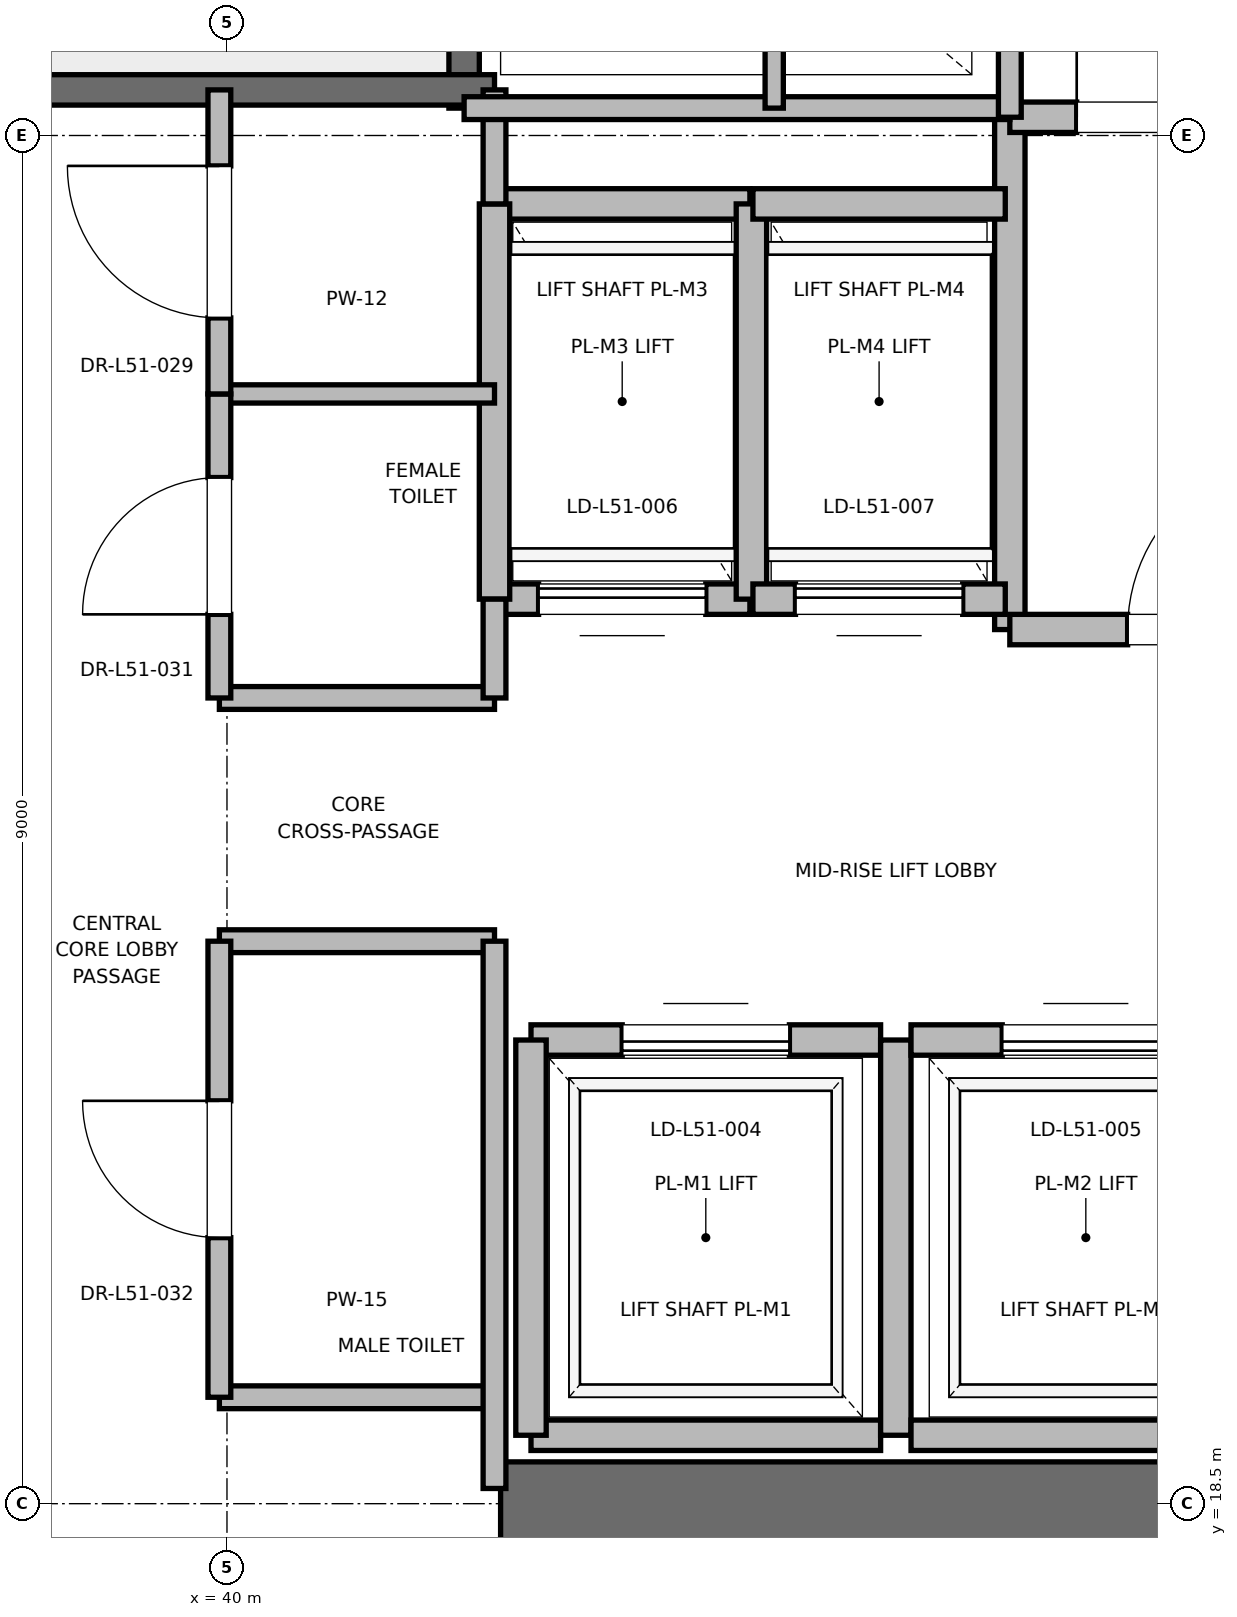
"""IFC4 building model, lengths in metres.
Left out: names, types, materials, properties, quantities, classifications, styles, units other than length and angle.
Written with IfcOpenShell. Run it as: python <this file> out.ifc"""

import sys

from ifc_helpers import new_model, si_unit, direction, frame, frame_2d, origin, place, context, subcontext, project, spatial, rectangle, extrude, element, fill, save


model = new_model("IFC4")
c1 = context("Model", 3, precision=1e-05, world=origin(), true_north=direction((0.0, 1.0)))
c2 = subcontext(c1, "Body", "Model", "MODEL_VIEW")
j1 = project(units=[si_unit("LENGTHUNIT", "METRE"), si_unit("PLANEANGLEUNIT", "RADIAN")], contexts=[c1])
p1 = place(None, origin())
s1 = spatial("IfcSite", under=j1, at=p1, CompositionType="ELEMENT")
p2 = place(p1, origin())
s2 = spatial("IfcBuilding", under=s1, at=p2, CompositionType="ELEMENT")
p3 = place(p2, frame((0.0, 0.0, 221.2)))
s3 = spatial("IfcBuildingStorey", under=s2, at=p3, CompositionType="ELEMENT", Elevation=221.2)
p4 = place(p3, frame((41.8, 18.5, 0.0), z_axis=(0.0, 0.0, 1.0), x_axis=(1.0, 0.0, 0.0)))
e1 = element("IfcWall", 1, at=p4, inside=s3, PredefinedType="SHEAR", context=c2, shape_type="SweptSolid", body=[
    extrude(rectangle(XDim=9.2, YDim=0.55, at=frame_2d((4.6, 0.0))), origin(), (0.0, 0.0, 1.0), 3.775),
])
p5 = place(p3, frame((41.56, 27.68, 0.0), z_axis=(0.0, 0.0, 1.0), x_axis=(0.0, 1.0, 0.0)))
e2 = element("IfcWall", 2, at=p5, inside=s3, PredefinedType="SOLIDWALL", context=c2, shape_type="SweptSolid", body=[
    extrude(rectangle(XDim=8.57, YDim=0.2, at=frame_2d((4.285, 0.0))), origin(), (0.0, 0.0, 1.0), 3.775),
])
p6 = place(p3, frame((38.44, 27.8, 0.0), z_axis=(0.0, 0.0, 1.0), x_axis=(1.0, 0.0, 0.0)))
e3 = element("IfcWall", 3, at=p6, inside=s3, PredefinedType="SOLIDWALL", context=c2, shape_type="SweptSolid", body=[
    extrude(rectangle(XDim=3.32, YDim=0.2, at=frame_2d((1.66, 0.0))), origin(), (0.0, 0.0, 1.0), 3.775),
])
p7 = place(p3, frame((45.15, 24.25, 0.0), z_axis=(0.0, 0.0, 1.0), x_axis=(0.0, 1.0, 0.0)))
e4 = element("IfcWall", 4, at=p7, inside=s3, PredefinedType="PARTITIONING", context=c2, shape_type="SweptSolid", body=[
    extrude(rectangle(XDim=3.37, YDim=0.2, at=frame_2d((1.685, 0.0))), origin(), (0.0, 0.0, 1.0), 3.775),
])
p8 = place(p3, frame((45.15, 24.25, 0.0), z_axis=(0.0, 0.0, 1.0), x_axis=(1.0, 0.0, 0.0)))
e5 = element("IfcWall", 5, at=p8, inside=s3, PredefinedType="PARTITIONING", context=c2, shape_type="SweptSolid", body=[
    extrude(rectangle(XDim=2.7, YDim=0.2, at=frame_2d((1.35, 0.0))), origin(), (0.0, 0.0, 1.0), 3.775),
])
p9 = place(p8, frame((0.775, 0.0, 0.0)))
e6 = element("IfcOpeningElement", 6, at=p9, cuts=e5, PredefinedType="OPENING", context=c2, shape_type="SweptSolid", body=[
    extrude(rectangle(XDim=1.15, YDim=2.2, at=frame_2d((0.575, 1.1))), frame((0.0, 0.1, 0.0), z_axis=(0.0, -1.0, 0.0), x_axis=(1.0, 0.0, 0.0)), (0.0, 0.0, 1.0), 0.2),
])
p10 = place(p3, frame((45.15, 27.62, 0.0), z_axis=(0.0, 0.0, 1.0), x_axis=(1.0, 0.0, 0.0)))
e7 = element("IfcWall", 7, at=p10, inside=s3, PredefinedType="PARTITIONING", context=c2, shape_type="SweptSolid", body=[
    extrude(rectangle(XDim=2.03, YDim=0.2, at=frame_2d((1.015, 0.0))), origin(), (0.0, 0.0, 1.0), 3.775),
])
p11 = place(p10, frame((0.44, 0.0, 0.0)))
e8 = element("IfcOpeningElement", 8, at=p11, cuts=e7, PredefinedType="OPENING", context=c2, shape_type="SweptSolid", body=[
    extrude(rectangle(XDim=1.15, YDim=2.2, at=frame_2d((0.575, 1.1))), frame((0.0, 0.1, 0.0), z_axis=(0.0, -1.0, 0.0), x_axis=(1.0, 0.0, 0.0)), (0.0, 0.0, 1.0), 0.2),
])
p12 = place(p3, frame((42.0, 18.95, 0.0), z_axis=(0.0, 0.0, 1.0), x_axis=(1.0, 0.0, 0.0)))
e9 = element("IfcWall", 9, at=p12, inside=s3, PredefinedType="SOLIDWALL", context=c2, shape_type="SweptSolid", body=[
    extrude(rectangle(XDim=2.3, YDim=0.2, at=frame_2d((1.15, 0.0))), origin(), (0.0, 0.0, 1.0), 2.755),
])
p13 = place(p3, frame((44.3, 21.55, 0.0), z_axis=(0.0, 0.0, 1.0), x_axis=(-1.0, 0.0, 0.0)))
e10 = element("IfcWall", 10, at=p13, inside=s3, PredefinedType="SOLIDWALL", context=c2, shape_type="SweptSolid", body=[
    extrude(rectangle(XDim=2.3, YDim=0.2, at=frame_2d((1.15, 0.0))), origin(), (0.0, 0.0, 1.0), 3.775),
])
p14 = place(p13, frame((0.6, 0.0, 0.0)))
e11 = element("IfcOpeningElement", 11, at=p14, cuts=e10, PredefinedType="OPENING", context=c2, shape_type="SweptSolid", body=[
    extrude(rectangle(XDim=1.1, YDim=2.2, at=frame_2d((0.55, 1.1))), frame((0.0, 0.1, 0.0), z_axis=(0.0, -1.0, 0.0), x_axis=(1.0, 0.0, 0.0)), (0.0, 0.0, 1.0), 0.2),
])
p15 = place(p3, frame((42.0, 21.55, 0.0), z_axis=(0.0, 0.0, 1.0), x_axis=(0.0, -1.0, 0.0)))
e12 = element("IfcWall", 12, at=p15, inside=s3, PredefinedType="SOLIDWALL", context=c2, shape_type="SweptSolid", body=[
    extrude(rectangle(XDim=2.6, YDim=0.2, at=frame_2d((1.3, 0.0))), origin(), (0.0, 0.0, 1.0), 2.755),
])
p16 = place(p3, frame((44.4, 18.95, 0.0), z_axis=(0.0, 0.0, 1.0), x_axis=(0.0, 1.0, 0.0)))
e13 = element("IfcWall", 13, at=p16, inside=s3, PredefinedType="SOLIDWALL", context=c2, shape_type="SweptSolid", body=[
    extrude(rectangle(XDim=2.6, YDim=0.2, at=frame_2d((1.3, 0.0))), origin(), (0.0, 0.0, 1.0), 3.775),
])
p17 = place(p3, frame((44.5, 18.95, 0.0), z_axis=(0.0, 0.0, 1.0), x_axis=(1.0, 0.0, 0.0)))
e14 = element("IfcWall", 14, at=p17, inside=s3, PredefinedType="SOLIDWALL", context=c2, shape_type="SweptSolid", body=[
    extrude(rectangle(XDim=2.3, YDim=0.2, at=frame_2d((1.15, 0.0))), origin(), (0.0, 0.0, 1.0), 3.775),
])
p18 = place(p3, frame((46.8, 21.55, 0.0), z_axis=(0.0, 0.0, 1.0), x_axis=(-1.0, 0.0, 0.0)))
e15 = element("IfcWall", 15, at=p18, inside=s3, PredefinedType="SOLIDWALL", context=c2, shape_type="SweptSolid", body=[
    extrude(rectangle(XDim=2.3, YDim=0.2, at=frame_2d((1.15, 0.0))), origin(), (0.0, 0.0, 1.0), 3.775),
])
p19 = place(p18, frame((0.6, 0.0, 0.0)))
e16 = element("IfcOpeningElement", 16, at=p19, cuts=e15, PredefinedType="OPENING", context=c2, shape_type="SweptSolid", body=[
    extrude(rectangle(XDim=1.1, YDim=2.2, at=frame_2d((0.55, 1.1))), frame((0.0, 0.1, 0.0), z_axis=(0.0, -1.0, 0.0), x_axis=(1.0, 0.0, 0.0)), (0.0, 0.0, 1.0), 0.2),
])
p20 = place(p3, frame((41.76, 24.45, 0.0), z_axis=(0.0, 0.0, 1.0), x_axis=(1.0, 0.0, 0.0)))
e17 = element("IfcWall", 17, at=p20, inside=s3, PredefinedType="SOLIDWALL", context=c2, shape_type="SweptSolid", body=[
    extrude(rectangle(XDim=1.68, YDim=0.2, at=frame_2d((0.84, 0.0))), origin(), (0.0, 0.0, 1.0), 3.775),
])
p21 = place(p20, frame((0.29, 0.0, 0.0)))
e18 = element("IfcOpeningElement", 18, at=p21, cuts=e17, PredefinedType="OPENING", context=c2, shape_type="SweptSolid", body=[
    extrude(rectangle(XDim=1.1, YDim=2.2, at=frame_2d((0.55, 1.1))), frame((0.0, 0.1, 0.0), z_axis=(0.0, -1.0, 0.0), x_axis=(1.0, 0.0, 0.0)), (0.0, 0.0, 1.0), 0.2),
])
p22 = place(p3, frame((43.44, 27.05, 0.0), z_axis=(0.0, 0.0, 1.0), x_axis=(-1.0, 0.0, 0.0)))
e19 = element("IfcWall", 19, at=p22, inside=s3, PredefinedType="SOLIDWALL", context=c2, shape_type="SweptSolid", body=[
    extrude(rectangle(XDim=1.68, YDim=0.2, at=frame_2d((0.84, 0.0))), origin(), (0.0, 0.0, 1.0), 3.775),
])
for number, where, z_axis, x_axis in (
    (20, (41.76, 27.05, 0.0), (0.0, 0.0, 1.0), (0.0, -1.0, 0.0)),
    (21, (43.45, 24.45, 0.0), (0.0, 0.0, 1.0), (0.0, 1.0, 0.0)),
):
    element("IfcWall", number, at=place(p3, frame(where, z_axis=z_axis, x_axis=x_axis)), inside=s3, PredefinedType="SOLIDWALL", context=c2, shape_type="SweptSolid", body=[
        extrude(rectangle(XDim=2.6, YDim=0.2, at=frame_2d((1.3, 0.0))), origin(), (0.0, 0.0, 1.0), 3.775),
    ])
p23 = place(p3, frame((43.46, 24.45, 0.0), z_axis=(0.0, 0.0, 1.0), x_axis=(1.0, 0.0, 0.0)))
e22 = element("IfcWall", 22, at=p23, inside=s3, PredefinedType="SOLIDWALL", context=c2, shape_type="SweptSolid", body=[
    extrude(rectangle(XDim=1.66, YDim=0.2, at=frame_2d((0.83, 0.0))), origin(), (0.0, 0.0, 1.0), 3.775),
])
p24 = place(p23, frame((0.28, 0.0, 0.0)))
e23 = element("IfcOpeningElement", 23, at=p24, cuts=e22, PredefinedType="OPENING", context=c2, shape_type="SweptSolid", body=[
    extrude(rectangle(XDim=1.1, YDim=2.2, at=frame_2d((0.55, 1.1))), frame((0.0, 0.1, 0.0), z_axis=(0.0, -1.0, 0.0), x_axis=(1.0, 0.0, 0.0)), (0.0, 0.0, 1.0), 0.2),
])
p25 = place(p3, frame((45.12, 27.05, 0.0), z_axis=(0.0, 0.0, 1.0), x_axis=(-1.0, 0.0, 0.0)))
e24 = element("IfcWall", 24, at=p25, inside=s3, PredefinedType="SOLIDWALL", context=c2, shape_type="SweptSolid", body=[
    extrude(rectangle(XDim=1.66, YDim=0.2, at=frame_2d((0.83, 0.0))), origin(), (0.0, 0.0, 1.0), 3.775),
])
for number, where, z_axis, x_axis in (
    (25, (39.95, 19.2, 0.0), (0.0, 0.0, 1.0), (1.0, 0.0, 0.0)),
    (26, (39.95, 22.2, 0.0), (0.0, 0.0, 1.0), (1.0, 0.0, 0.0)),
    (27, (39.95, 23.8, 0.0), (0.0, 0.0, 1.0), (1.0, 0.0, 0.0)),
):
    element("IfcWall", number, at=place(p3, frame(where, z_axis=z_axis, x_axis=x_axis)), inside=s3, PredefinedType="PARTITIONING", context=c2, shape_type="SweptSolid", body=[
        extrude(rectangle(XDim=1.81, YDim=0.15, at=frame_2d((0.905, 0.0))), origin(), (0.0, 0.0, 1.0), 2.85),
    ])
p26 = place(p3, frame((39.95, 25.8, 0.0), z_axis=(0.0, 0.0, 1.0), x_axis=(1.0, 0.0, 0.0)))
e28 = element("IfcWall", 28, at=p26, inside=s3, PredefinedType="PARTITIONING", context=c2, shape_type="SweptSolid", body=[
    extrude(rectangle(XDim=1.81, YDim=0.12, at=frame_2d((0.905, 0.0))), origin(), (0.0, 0.0, 1.0), 2.85),
])
p27 = place(p3, frame((41.76, 18.6, 0.0), z_axis=(0.0, 0.0, 1.0), x_axis=(0.0, 1.0, 0.0)))
e29 = element("IfcWall", 29, at=p27, inside=s3, PredefinedType="PARTITIONING", context=c2, shape_type="SweptSolid", body=[
    extrude(rectangle(XDim=3.6, YDim=0.15, at=frame_2d((1.8, 0.0))), origin(), (0.0, 0.0, 1.0), 2.755),
])
p28 = place(p3, frame((41.76, 23.8, 0.0), z_axis=(0.0, 0.0, 1.0), x_axis=(0.0, 1.0, 0.0)))
e30 = element("IfcWall", 30, at=p28, inside=s3, PredefinedType="PARTITIONING", context=c2, shape_type="SweptSolid", body=[
    extrude(rectangle(XDim=0.65, YDim=0.15, at=frame_2d((0.325, 0.0))), origin(), (0.0, 0.0, 1.0), 2.85),
])
p29 = place(p3, frame((41.76, 27.05, 0.0), z_axis=(0.0, 0.0, 1.0), x_axis=(0.0, 1.0, 0.0)))
e31 = element("IfcWall", 31, at=p29, inside=s3, PredefinedType="PARTITIONING", context=c2, shape_type="SweptSolid", body=[
    extrude(rectangle(XDim=0.75, YDim=0.15, at=frame_2d((0.375, 0.0))), origin(), (0.0, 0.0, 1.0), 2.85),
])
p30 = place(p3, frame((39.95, 19.2, 0.0), z_axis=(0.0, 0.0, 1.0), x_axis=(0.0, 1.0, 0.0)))
e32 = element("IfcWall", 32, at=p30, inside=s3, PredefinedType="PARTITIONING", context=c2, shape_type="SweptSolid", body=[
    extrude(rectangle(XDim=3.0, YDim=0.15, at=frame_2d((1.5, 0.0))), origin(), (0.0, 0.0, 1.0), 2.85),
])
p31 = place(p30, frame((1.05, 0.0, 0.0)))
e33 = element("IfcOpeningElement", 33, at=p31, cuts=e32, PredefinedType="OPENING", context=c2, shape_type="SweptSolid", body=[
    extrude(rectangle(XDim=0.9, YDim=2.1, at=frame_2d((0.45, 1.05))), frame((0.0, 0.075, 0.0), z_axis=(0.0, -1.0, 0.0), x_axis=(1.0, 0.0, 0.0)), (0.0, 0.0, 1.0), 0.15),
])
p32 = place(p3, frame((39.95, 23.8, 0.0), z_axis=(0.0, 0.0, 1.0), x_axis=(0.0, 1.0, 0.0)))
e34 = element("IfcWall", 34, at=p32, inside=s3, PredefinedType="PARTITIONING", context=c2, shape_type="SweptSolid", body=[
    extrude(rectangle(XDim=2.0, YDim=0.15, at=frame_2d((1.0, 0.0))), origin(), (0.0, 0.0, 1.0), 2.85),
])
p33 = place(p32, frame((0.55, 0.0, 0.0)))
e35 = element("IfcOpeningElement", 35, at=p33, cuts=e34, PredefinedType="OPENING", context=c2, shape_type="SweptSolid", body=[
    extrude(rectangle(XDim=0.9, YDim=2.1, at=frame_2d((0.45, 1.05))), frame((0.0, 0.075, 0.0), z_axis=(0.0, -1.0, 0.0), x_axis=(1.0, 0.0, 0.0)), (0.0, 0.0, 1.0), 0.15),
])
p34 = place(p3, frame((39.95, 25.8, 0.0), z_axis=(0.0, 0.0, 1.0), x_axis=(0.0, 1.0, 0.0)))
e36 = element("IfcWall", 36, at=p34, inside=s3, PredefinedType="PARTITIONING", context=c2, shape_type="SweptSolid", body=[
    extrude(rectangle(XDim=2.0, YDim=0.15, at=frame_2d((1.0, 0.0))), origin(), (0.0, 0.0, 1.0), 2.85),
])
p35 = place(p34, frame((0.5, 0.0, 0.0)))
e37 = element("IfcOpeningElement", 37, at=p35, cuts=e36, PredefinedType="OPENING", context=c2, shape_type="SweptSolid", body=[
    extrude(rectangle(XDim=1.0, YDim=2.15, at=frame_2d((0.5, 1.075))), frame((0.0, 0.075, 0.0), z_axis=(0.0, -1.0, 0.0), x_axis=(1.0, 0.0, 0.0)), (0.0, 0.0, 1.0), 0.15),
])
p36 = place(p3, frame((41.56, 27.68, 0.0), z_axis=(0.0, 0.0, 1.0), x_axis=(1.0, 0.0, 0.0)))
e38 = element("IfcWall", 38, at=p36, inside=s3, PredefinedType="PARTITIONING", context=c2, shape_type="SweptSolid", body=[
    extrude(rectangle(XDim=3.59, YDim=0.15, at=frame_2d((1.795, 0.0))), origin(), (0.0, 0.0, 1.0), 2.85),
])
p37 = place(p3, frame((45.15, 27.62, 0.0), z_axis=(0.0, 0.0, 1.0), x_axis=(0.0, 1.0, 0.0)))
e39 = element("IfcWall", 39, at=p37, inside=s3, PredefinedType="PARTITIONING", context=c2, shape_type="SweptSolid", body=[
    extrude(rectangle(XDim=3.1, YDim=0.15, at=frame_2d((1.55, 0.0))), origin(), (0.0, 0.0, 1.0), 2.85),
])
p38 = place(p3, frame((43.6, 27.68, 0.0), z_axis=(0.0, 0.0, 1.0), x_axis=(0.0, 1.0, 0.0)))
e40 = element("IfcWall", 40, at=p38, inside=s3, PredefinedType="PARTITIONING", context=c2, shape_type="SweptSolid", body=[
    extrude(rectangle(XDim=3.04, YDim=0.12, at=frame_2d((1.52, 0.0))), origin(), (0.0, 0.0, 1.0), 2.85),
])
p39 = place(p9, origin())
e41 = element("IfcDoor", 41, at=p39, inside=s3, OperationType="SINGLE_SWING_RIGHT", PredefinedType="DOOR", context=c2, shape_type="SweptSolid", body=[
    extrude(rectangle(XDim=1.15, YDim=2.2, at=frame_2d((0.575, 1.1))), frame((0.0, 0.025, 0.0), z_axis=(0.0, -1.0, 0.0), x_axis=(1.0, 0.0, 0.0)), (0.0, 0.0, 1.0), 0.05),
])
fill(e6, e41)
p40 = place(p11, origin())
e42 = element("IfcDoor", 42, at=p40, inside=s3, OperationType="SINGLE_SWING_LEFT", PredefinedType="DOOR", context=c2, shape_type="SweptSolid", body=[
    extrude(rectangle(XDim=1.15, YDim=2.2, at=frame_2d((0.575, 1.1))), frame((0.0, 0.025, 0.0), z_axis=(0.0, -1.0, 0.0), x_axis=(1.0, 0.0, 0.0)), (0.0, 0.0, 1.0), 0.05),
])
fill(e8, e42)
p41 = place(p14, origin())
e43 = element("IfcDoor", 43, at=p41, inside=s3, OperationType="SLIDING_TO_RIGHT", PredefinedType="DOOR", context=c2, shape_type="SweptSolid", body=[
    extrude(rectangle(XDim=1.1, YDim=2.2, at=frame_2d((0.55, 1.1))), frame((0.0, 0.025, 0.0), z_axis=(0.0, -1.0, 0.0), x_axis=(1.0, 0.0, 0.0)), (0.0, 0.0, 1.0), 0.05),
])
fill(e11, e43)
p42 = place(p19, origin())
e44 = element("IfcDoor", 44, at=p42, inside=s3, OperationType="SLIDING_TO_RIGHT", PredefinedType="DOOR", context=c2, shape_type="SweptSolid", body=[
    extrude(rectangle(XDim=1.1, YDim=2.2, at=frame_2d((0.55, 1.1))), frame((0.0, 0.025, 0.0), z_axis=(0.0, -1.0, 0.0), x_axis=(1.0, 0.0, 0.0)), (0.0, 0.0, 1.0), 0.05),
])
fill(e16, e44)
p43 = place(p21, origin())
e45 = element("IfcDoor", 45, at=p43, inside=s3, OperationType="SLIDING_TO_RIGHT", PredefinedType="DOOR", context=c2, shape_type="SweptSolid", body=[
    extrude(rectangle(XDim=1.1, YDim=2.2, at=frame_2d((0.55, 1.1))), frame((0.0, 0.025, 0.0), z_axis=(0.0, -1.0, 0.0), x_axis=(1.0, 0.0, 0.0)), (0.0, 0.0, 1.0), 0.05),
])
fill(e18, e45)
p44 = place(p24, origin())
e46 = element("IfcDoor", 46, at=p44, inside=s3, OperationType="SLIDING_TO_RIGHT", PredefinedType="DOOR", context=c2, shape_type="SweptSolid", body=[
    extrude(rectangle(XDim=1.1, YDim=2.2, at=frame_2d((0.55, 1.1))), frame((0.0, 0.025, 0.0), z_axis=(0.0, -1.0, 0.0), x_axis=(1.0, 0.0, 0.0)), (0.0, 0.0, 1.0), 0.05),
])
fill(e23, e46)
p45 = place(p31, origin())
e47 = element("IfcDoor", 47, at=p45, inside=s3, OperationType="SINGLE_SWING_RIGHT", PredefinedType="DOOR", context=c2, shape_type="SweptSolid", body=[
    extrude(rectangle(XDim=0.9, YDim=2.1, at=frame_2d((0.45, 1.05))), frame((0.0, 0.025, 0.0), z_axis=(0.0, -1.0, 0.0), x_axis=(1.0, 0.0, 0.0)), (0.0, 0.0, 1.0), 0.05),
])
fill(e33, e47)
p46 = place(p33, origin())
e48 = element("IfcDoor", 48, at=p46, inside=s3, OperationType="SINGLE_SWING_LEFT", PredefinedType="DOOR", context=c2, shape_type="SweptSolid", body=[
    extrude(rectangle(XDim=0.9, YDim=2.1, at=frame_2d((0.45, 1.05))), frame((0.0, 0.025, 0.0), z_axis=(0.0, -1.0, 0.0), x_axis=(1.0, 0.0, 0.0)), (0.0, 0.0, 1.0), 0.05),
])
fill(e35, e48)
p47 = place(p35, origin())
e49 = element("IfcDoor", 49, at=p47, inside=s3, OperationType="SINGLE_SWING_RIGHT", PredefinedType="DOOR", context=c2, shape_type="SweptSolid", body=[
    extrude(rectangle(XDim=1.0, YDim=2.15, at=frame_2d((0.5, 1.075))), frame((0.0, 0.025, 0.0), z_axis=(0.0, -1.0, 0.0), x_axis=(1.0, 0.0, 0.0)), (0.0, 0.0, 1.0), 0.05),
])
fill(e37, e49)
save(model, sys.argv[1])
